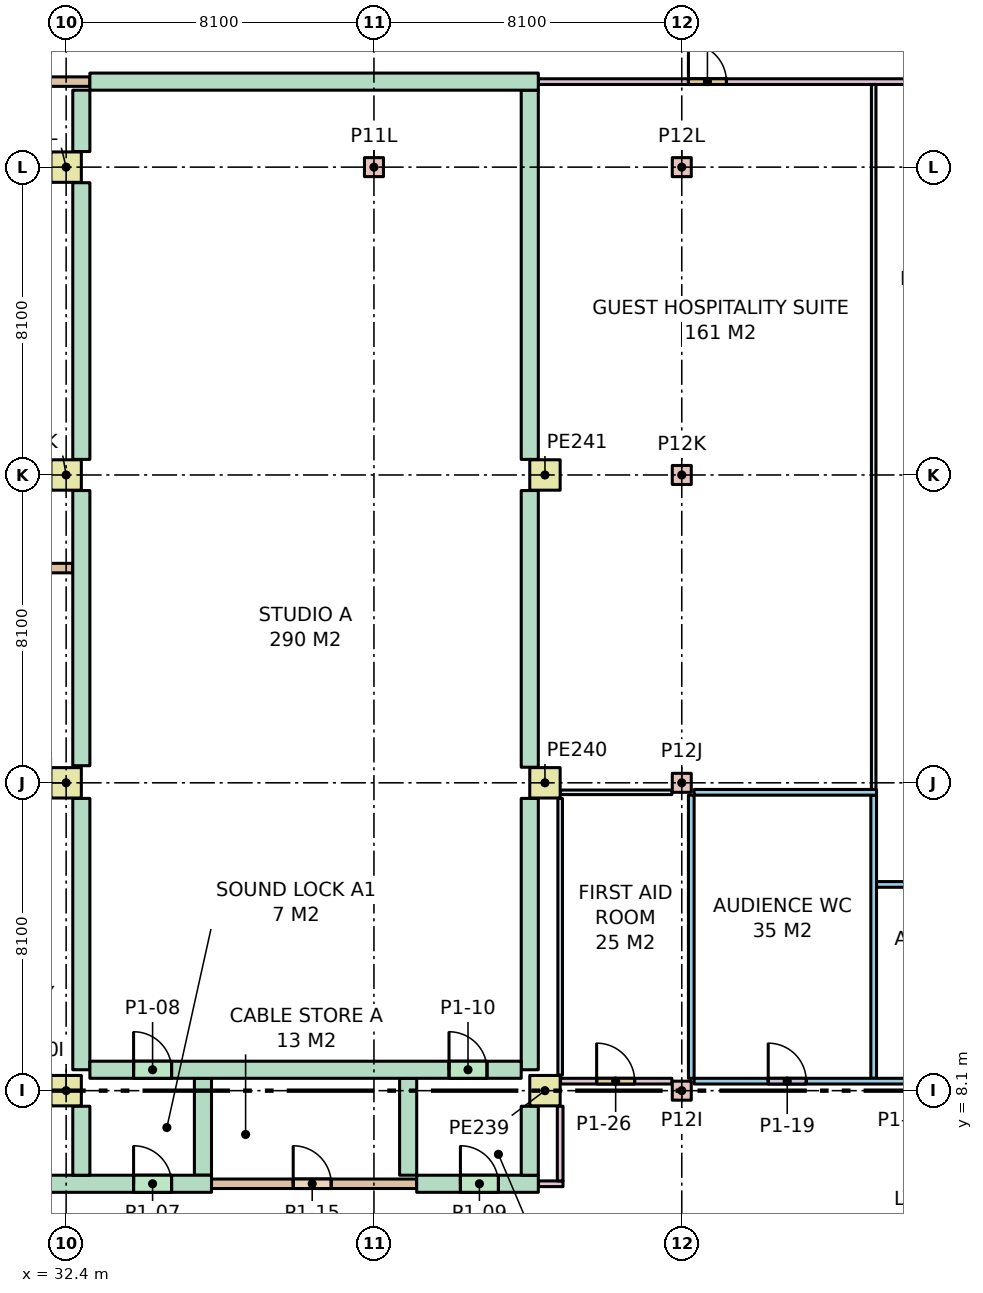
"""IFC4 building model, lengths in metres.
Left out: names, types, materials, properties, quantities, classifications, styles, units other than length and angle.
Written with IfcOpenShell. Run it as: python <this file> out.ifc"""

import sys

from ifc_helpers import new_model, si_unit, direction, frame, frame_2d, origin, origin_2d, place, context, subcontext, project, spatial, rectangle, extrude, element, fill, save


model = new_model("IFC4")
c1 = context("Model", 3, precision=1e-05, world=origin(), true_north=direction((0.0, 1.0)))
c2 = subcontext(c1, "Body", "Model", "MODEL_VIEW")
j1 = project(units=[si_unit("LENGTHUNIT", "METRE"), si_unit("PLANEANGLEUNIT", "RADIAN")], contexts=[c1])
p1 = place(None, origin())
s1 = spatial("IfcSite", under=j1, at=p1, CompositionType="ELEMENT")
p2 = place(p1, origin())
s2 = spatial("IfcBuilding", under=s1, at=p2, CompositionType="ELEMENT")
p3 = place(p2, frame((0.0, 0.0, 6.0)))
s3 = spatial("IfcBuildingStorey", under=s2, at=p3, CompositionType="ELEMENT", Elevation=6.0)
for number, where, z_axis, x_axis in (
    (1, (32.4, 8.1, 0.0), (0.0, 0.0, 1.0), (1.0, 0.0, 0.0)),
    (2, (32.4, 16.2, 0.0), (0.0, 0.0, 1.0), (1.0, 0.0, 0.0)),
    (3, (32.4, 24.3, 0.0), (0.0, 0.0, 1.0), (1.0, 0.0, 0.0)),
    (4, (32.4, 32.4, 0.0), (0.0, 0.0, 1.0), (1.0, 0.0, 0.0)),
):
    element("IfcColumn", number, at=place(p3, frame(where, z_axis=z_axis, x_axis=x_axis)), inside=s3, PredefinedType="COLUMN", context=c2, shape_type="SweptSolid", body=[
        extrude(rectangle(XDim=0.8, YDim=0.8, at=origin_2d()), origin(), (0.0, 0.0, 1.0), 7.0),
    ])
for number, where, z_axis, x_axis in (
    (5, (40.5, 32.4, 0.0), (0.0, 0.0, 1.0), (1.0, 0.0, 0.0)),
    (6, (48.6, 8.1, 0.0), (0.0, 0.0, 1.0), (1.0, 0.0, 0.0)),
    (7, (48.6, 16.2, 0.0), (0.0, 0.0, 1.0), (1.0, 0.0, 0.0)),
    (8, (48.6, 24.3, 0.0), (0.0, 0.0, 1.0), (1.0, 0.0, 0.0)),
    (9, (48.6, 32.4, 0.0), (0.0, 0.0, 1.0), (1.0, 0.0, 0.0)),
):
    element("IfcColumn", number, at=place(p3, frame(where, z_axis=z_axis, x_axis=x_axis)), inside=s3, PredefinedType="COLUMN", context=c2, shape_type="SweptSolid", body=[
        extrude(rectangle(XDim=0.5, YDim=0.5, at=origin_2d()), origin(), (0.0, 0.0, 1.0), 7.0),
    ])
for number, where, z_axis, x_axis in (
    (10, (45.0, 8.1, 0.0), (0.0, 0.0, 1.0), (1.0, 0.0, 0.0)),
    (11, (45.0, 16.2, 0.0), (0.0, 0.0, 1.0), (1.0, 0.0, 0.0)),
    (12, (45.0, 24.3, 0.0), (0.0, 0.0, 1.0), (1.0, 0.0, 0.0)),
):
    element("IfcColumn", number, at=place(p3, frame(where, z_axis=z_axis, x_axis=x_axis)), inside=s3, PredefinedType="COLUMN", context=c2, shape_type="SweptSolid", body=[
        extrude(rectangle(XDim=0.8, YDim=0.8, at=origin_2d()), origin(), (0.0, 0.0, 1.0), 7.0),
    ])
for number, where, z_axis, x_axis in (
    (13, (53.65, 8.425, 0.0), (0.0, 0.0, 1.0), (0.0, 1.0, 0.0)),
    (14, (48.85, 8.425, 0.0), (0.0, 0.0, 1.0), (0.0, 1.0, 0.0)),
):
    element("IfcWall", number, at=place(p3, frame(where, z_axis=z_axis, x_axis=x_axis)), inside=s3, PredefinedType="PARTITIONING", context=c2, shape_type="SweptSolid", body=[
        extrude(rectangle(XDim=7.45, YDim=0.15, at=frame_2d((3.725, 0.0))), origin(), (0.0, 0.0, 1.0), 6.68),
    ])
p4 = place(p3, frame((48.925, 15.95, 0.0), z_axis=(0.0, 0.0, 1.0), x_axis=(1.0, 0.0, 0.0)))
e15 = element("IfcWall", 15, at=p4, inside=s3, PredefinedType="PARTITIONING", context=c2, shape_type="SweptSolid", body=[
    extrude(rectangle(XDim=4.8, YDim=0.15, at=frame_2d((2.4, 0.0))), origin(), (0.0, 0.0, 1.0), 6.68),
])
p5 = place(p3, frame((48.925, 8.35, 0.0), z_axis=(0.0, 0.0, 1.0), x_axis=(1.0, 0.0, 0.0)))
e16 = element("IfcWall", 16, at=p5, inside=s3, PredefinedType="PARTITIONING", context=c2, shape_type="SweptSolid", body=[
    extrude(rectangle(XDim=7.515, YDim=0.15, at=frame_2d((3.757, 0.0))), origin(), (0.0, 0.0, 1.0), 6.68),
])
p6 = place(p5, frame((1.95, 0.0, 0.0)))
e17 = element("IfcOpeningElement", 17, at=p6, cuts=e16, PredefinedType="OPENING", context=c2, shape_type="SweptSolid", body=[
    extrude(rectangle(XDim=1.0, YDim=2.1, at=frame_2d((0.5, 1.05))), frame((0.0, 0.085, 0.0), z_axis=(0.0, -1.0, 0.0), x_axis=(1.0, 0.0, 0.0)), (0.0, 0.0, 1.0), 0.17),
])
p7 = place(p5, frame((5.65, 0.0, 0.0)))
e18 = element("IfcOpeningElement", 18, at=p7, cuts=e16, PredefinedType="OPENING", context=c2, shape_type="SweptSolid", body=[
    extrude(rectangle(XDim=1.0, YDim=2.1, at=frame_2d((0.5, 1.05))), frame((0.0, 0.085, 0.0), z_axis=(0.0, -1.0, 0.0), x_axis=(1.0, 0.0, 0.0)), (0.0, 0.0, 1.0), 0.17),
])
p8 = place(p3, frame((53.725, 13.527, 0.0), z_axis=(0.0, 0.0, 1.0), x_axis=(1.0, 0.0, 0.0)))
e19 = element("IfcWall", 19, at=p8, inside=s3, PredefinedType="PARTITIONING", context=c2, shape_type="SweptSolid", body=[
    extrude(rectangle(XDim=4.05, YDim=0.15, at=frame_2d((2.025, 0.0))), origin(), (0.0, 0.0, 1.0), 6.68),
])
p9 = place(p3, frame((53.65, 16.025, 0.0), z_axis=(0.0, 0.0, 1.0), x_axis=(0.0, 1.0, 0.0)))
e20 = element("IfcWall", 20, at=p9, inside=s3, PredefinedType="PARTITIONING", context=c2, shape_type="SweptSolid", body=[
    extrude(rectangle(XDim=18.55, YDim=0.12, at=frame_2d((9.275, 0.0))), origin(), (0.0, 0.0, 1.0), 6.68),
])
p10 = place(p3, frame((36.225, 5.65, 0.0), z_axis=(0.0, 0.0, 1.0), x_axis=(1.0, 0.0, 0.0)))
e21 = element("IfcWall", 21, at=p10, inside=s3, PredefinedType="PARTITIONING", context=c2, shape_type="SweptSolid", body=[
    extrude(rectangle(XDim=5.4, YDim=0.25, at=frame_2d((2.7, 0.0))), origin(), (0.0, 0.0, 1.0), 6.68),
])
p11 = place(p10, frame((2.15, 0.0, 0.0)))
e22 = element("IfcOpeningElement", 22, at=p11, cuts=e21, PredefinedType="OPENING", context=c2, shape_type="SweptSolid", body=[
    extrude(rectangle(XDim=1.0, YDim=2.1, at=frame_2d((0.5, 1.05))), frame((0.0, 0.135, 0.0), z_axis=(0.0, -1.0, 0.0), x_axis=(1.0, 0.0, 0.0)), (0.0, 0.0, 1.0), 0.27),
])
for number, where, z_axis, x_axis in (
    (23, (36.0, 5.875, 0.0), (0.0, 0.0, 1.0), (0.0, 1.0, 0.0)),
    (24, (41.4, 5.875, 0.0), (0.0, 0.0, 1.0), (0.0, 1.0, 0.0)),
):
    element("IfcWall", number, at=place(p3, frame(where, z_axis=z_axis, x_axis=x_axis)), inside=s3, PredefinedType="PARTITIONING", context=c2, shape_type="SweptSolid", body=[
        extrude(rectangle(XDim=2.55, YDim=0.45, at=frame_2d((1.275, 0.0))), origin(), (0.0, 0.0, 1.0), 6.68),
    ])
p12 = place(p3, frame((24.525, 5.65, 0.0), z_axis=(0.0, 0.0, 1.0), x_axis=(1.0, 0.0, 0.0)))
e25 = element("IfcWall", 25, at=p12, inside=s3, PredefinedType="PARTITIONING", context=c2, shape_type="SweptSolid", body=[
    extrude(rectangle(XDim=11.7, YDim=0.45, at=frame_2d((5.85, 0.0))), origin(), (0.0, 0.0, 1.0), 6.68),
])
p13 = place(p12, frame((9.65, 0.0, 0.0)))
e26 = element("IfcOpeningElement", 26, at=p13, cuts=e25, PredefinedType="OPENING", context=c2, shape_type="SweptSolid", body=[
    extrude(rectangle(XDim=1.0, YDim=2.1, at=frame_2d((0.5, 1.05))), frame((0.0, 0.235, 0.0), z_axis=(0.0, -1.0, 0.0), x_axis=(1.0, 0.0, 0.0)), (0.0, 0.0, 1.0), 0.47),
])
p14 = place(p12, frame((3.75, 0.0, 0.0)))
e27 = element("IfcOpeningElement", 27, at=p14, cuts=e25, PredefinedType="OPENING", context=c2, shape_type="SweptSolid", body=[
    extrude(rectangle(XDim=1.0, YDim=2.1, at=frame_2d((0.5, 1.05))), frame((0.0, 0.235, 0.0), z_axis=(0.0, -1.0, 0.0), x_axis=(1.0, 0.0, 0.0)), (0.0, 0.0, 1.0), 0.47),
])
p15 = place(p3, frame((32.8, 5.875, 0.0), z_axis=(0.0, 0.0, 1.0), x_axis=(0.0, 1.0, 0.0)))
e28 = element("IfcWall", 28, at=p15, inside=s3, PredefinedType="PARTITIONING", context=c2, shape_type="SweptSolid", body=[
    extrude(rectangle(XDim=1.815, YDim=0.45, at=frame_2d((0.907, 0.0))), origin(), (0.0, 0.0, 1.0), 6.68),
])
p16 = place(p3, frame((32.8, 8.65, 0.0), z_axis=(0.0, 0.0, 1.0), x_axis=(0.0, 1.0, 0.0)))
e29 = element("IfcWall", 29, at=p16, inside=s3, PredefinedType="PARTITIONING", context=c2, shape_type="SweptSolid", body=[
    extrude(rectangle(XDim=7.14, YDim=0.45, at=frame_2d((3.57, 0.0))), origin(), (0.0, 0.0, 1.0), 6.68),
])
p17 = place(p3, frame((44.825, 5.65, 0.0), z_axis=(0.0, 0.0, 1.0), x_axis=(1.0, 0.0, 0.0)))
e30 = element("IfcWall", 30, at=p17, inside=s3, PredefinedType="PARTITIONING", context=c2, shape_type="SweptSolid", body=[
    extrude(rectangle(XDim=0.65, YDim=0.15, at=frame_2d((0.325, 0.0))), origin(), (0.0, 0.0, 1.0), 6.68),
])
p18 = place(p3, frame((41.625, 5.65, 0.0), z_axis=(0.0, 0.0, 1.0), x_axis=(1.0, 0.0, 0.0)))
e31 = element("IfcWall", 31, at=p18, inside=s3, PredefinedType="PARTITIONING", context=c2, shape_type="SweptSolid", body=[
    extrude(rectangle(XDim=3.2, YDim=0.45, at=frame_2d((1.6, 0.0))), origin(), (0.0, 0.0, 1.0), 6.68),
])
p19 = place(p18, frame((1.15, 0.0, 0.0)))
e32 = element("IfcOpeningElement", 32, at=p19, cuts=e31, PredefinedType="OPENING", context=c2, shape_type="SweptSolid", body=[
    extrude(rectangle(XDim=1.0, YDim=2.1, at=frame_2d((0.5, 1.05))), frame((0.0, 0.235, 0.0), z_axis=(0.0, -1.0, 0.0), x_axis=(1.0, 0.0, 0.0)), (0.0, 0.0, 1.0), 0.47),
])
p20 = place(p3, frame((45.41, 15.95, 0.0), z_axis=(0.0, 0.0, 1.0), x_axis=(1.0, 0.0, 0.0)))
e33 = element("IfcWall", 33, at=p20, inside=s3, PredefinedType="PARTITIONING", context=c2, shape_type="SweptSolid", body=[
    extrude(rectangle(XDim=2.93, YDim=0.12, at=frame_2d((1.465, 0.0))), origin(), (0.0, 0.0, 1.0), 6.68),
])
p21 = place(p3, frame((45.4, 8.51, 0.0), z_axis=(0.0, 0.0, 1.0), x_axis=(0.0, 1.0, 0.0)))
e34 = element("IfcWall", 34, at=p21, inside=s3, PredefinedType="PARTITIONING", context=c2, shape_type="SweptSolid", body=[
    extrude(rectangle(XDim=7.28, YDim=0.12, at=frame_2d((3.64, 0.0))), origin(), (0.0, 0.0, 1.0), 6.68),
])
p22 = place(p3, frame((45.41, 8.35, 0.0), z_axis=(0.0, 0.0, 1.0), x_axis=(1.0, 0.0, 0.0)))
e35 = element("IfcWall", 35, at=p22, inside=s3, PredefinedType="PARTITIONING", context=c2, shape_type="SweptSolid", body=[
    extrude(rectangle(XDim=2.93, YDim=0.15, at=frame_2d((1.465, 0.0))), origin(), (0.0, 0.0, 1.0), 6.68),
])
p23 = place(p22, frame((0.95, 0.0, 0.0)))
e36 = element("IfcOpeningElement", 36, at=p23, cuts=e35, PredefinedType="OPENING", context=c2, shape_type="SweptSolid", body=[
    extrude(rectangle(XDim=1.0, YDim=2.1, at=frame_2d((0.5, 1.05))), frame((0.0, 0.085, 0.0), z_axis=(0.0, -1.0, 0.0), x_axis=(1.0, 0.0, 0.0)), (0.0, 0.0, 1.0), 0.17),
])
p24 = place(p3, frame((44.6, 5.875, 0.0), z_axis=(0.0, 0.0, 1.0), x_axis=(0.0, 1.0, 0.0)))
e37 = element("IfcWall", 37, at=p24, inside=s3, PredefinedType="PARTITIONING", context=c2, shape_type="SweptSolid", body=[
    extrude(rectangle(XDim=1.815, YDim=0.45, at=frame_2d((0.907, 0.0))), origin(), (0.0, 0.0, 1.0), 6.68),
])
p25 = place(p3, frame((45.4, 5.725, 0.0), z_axis=(0.0, 0.0, 1.0), x_axis=(0.0, 1.0, 0.0)))
e38 = element("IfcWall", 38, at=p25, inside=s3, PredefinedType="PARTITIONING", context=c2, shape_type="SweptSolid", body=[
    extrude(rectangle(XDim=1.965, YDim=0.15, at=frame_2d((0.982, 0.0))), origin(), (0.0, 0.0, 1.0), 6.68),
])
p26 = place(p3, frame((44.825, 34.65, 0.0), z_axis=(0.0, 0.0, 1.0), x_axis=(1.0, 0.0, 0.0)))
e39 = element("IfcWall", 39, at=p26, inside=s3, PredefinedType="PARTITIONING", context=c2, shape_type="SweptSolid", body=[
    extrude(rectangle(XDim=14.455, YDim=0.15, at=frame_2d((7.227, 0.0))), origin(), (0.0, 0.0, 1.0), 6.68),
])
p27 = place(p26, frame((3.95, 0.0, 0.0)))
e40 = element("IfcOpeningElement", 40, at=p27, cuts=e39, PredefinedType="OPENING", context=c2, shape_type="SweptSolid", body=[
    extrude(rectangle(XDim=1.0, YDim=2.1, at=frame_2d((0.5, 1.05))), frame((0.0, 0.085, 0.0), z_axis=(0.0, -1.0, 0.0), x_axis=(1.0, 0.0, 0.0)), (0.0, 0.0, 1.0), 0.17),
])
p28 = place(p26, frame((11.135, 0.0, 0.0)))
e41 = element("IfcOpeningElement", 41, at=p28, cuts=e39, PredefinedType="OPENING", context=c2, shape_type="SweptSolid", body=[
    extrude(rectangle(XDim=1.0, YDim=2.1, at=frame_2d((0.5, 1.05))), frame((0.0, 0.085, 0.0), z_axis=(0.0, -1.0, 0.0), x_axis=(1.0, 0.0, 0.0)), (0.0, 0.0, 1.0), 0.17),
])
p29 = place(p3, frame((44.6, 8.65, 0.0), z_axis=(0.0, 0.0, 1.0), x_axis=(0.0, 1.0, 0.0)))
e42 = element("IfcWall", 42, at=p29, inside=s3, PredefinedType="PARTITIONING", context=c2, shape_type="SweptSolid", body=[
    extrude(rectangle(XDim=7.14, YDim=0.45, at=frame_2d((3.57, 0.0))), origin(), (0.0, 0.0, 1.0), 6.68),
])
p30 = place(p3, frame((44.6, 16.61, 0.0), z_axis=(0.0, 0.0, 1.0), x_axis=(0.0, 1.0, 0.0)))
e43 = element("IfcWall", 43, at=p30, inside=s3, PredefinedType="PARTITIONING", context=c2, shape_type="SweptSolid", body=[
    extrude(rectangle(XDim=7.28, YDim=0.45, at=frame_2d((3.64, 0.0))), origin(), (0.0, 0.0, 1.0), 6.68),
])
p31 = place(p3, frame((44.6, 24.71, 0.0), z_axis=(0.0, 0.0, 1.0), x_axis=(0.0, 1.0, 0.0)))
e44 = element("IfcWall", 44, at=p31, inside=s3, PredefinedType="PARTITIONING", context=c2, shape_type="SweptSolid", body=[
    extrude(rectangle(XDim=9.715, YDim=0.45, at=frame_2d((4.857, 0.0))), origin(), (0.0, 0.0, 1.0), 6.68),
])
p32 = place(p3, frame((33.025, 8.65, 0.0), z_axis=(0.0, 0.0, 1.0), x_axis=(1.0, 0.0, 0.0)))
e45 = element("IfcWall", 45, at=p32, inside=s3, PredefinedType="PARTITIONING", context=c2, shape_type="SweptSolid", body=[
    extrude(rectangle(XDim=11.35, YDim=0.45, at=frame_2d((5.675, 0.0))), origin(), (0.0, 0.0, 1.0), 6.68),
])
p33 = place(p32, frame((1.15, 0.0, 0.0)))
e46 = element("IfcOpeningElement", 46, at=p33, cuts=e45, PredefinedType="OPENING", context=c2, shape_type="SweptSolid", body=[
    extrude(rectangle(XDim=1.0, YDim=2.1, at=frame_2d((0.5, 1.05))), frame((0.0, 0.235, 0.0), z_axis=(0.0, -1.0, 0.0), x_axis=(1.0, 0.0, 0.0)), (0.0, 0.0, 1.0), 0.47),
])
p34 = place(p32, frame((9.45, 0.0, 0.0)))
e47 = element("IfcOpeningElement", 47, at=p34, cuts=e45, PredefinedType="OPENING", context=c2, shape_type="SweptSolid", body=[
    extrude(rectangle(XDim=1.0, YDim=2.1, at=frame_2d((0.5, 1.05))), frame((0.0, 0.235, 0.0), z_axis=(0.0, -1.0, 0.0), x_axis=(1.0, 0.0, 0.0)), (0.0, 0.0, 1.0), 0.47),
])
p35 = place(p3, frame((25.168, 34.65, 0.0), z_axis=(0.0, 0.0, 1.0), x_axis=(1.0, 0.0, 0.0)))
e48 = element("IfcWall", 48, at=p35, inside=s3, PredefinedType="PARTITIONING", context=c2, shape_type="SweptSolid", body=[
    extrude(rectangle(XDim=7.857, YDim=0.25, at=frame_2d((3.928, 0.0))), origin(), (0.0, 0.0, 1.0), 6.68),
])
p36 = place(p35, frame((3.45, 0.0, 0.0)))
e49 = element("IfcOpeningElement", 49, at=p36, cuts=e48, PredefinedType="OPENING", context=c2, shape_type="SweptSolid", body=[
    extrude(rectangle(XDim=1.0, YDim=2.1, at=frame_2d((0.5, 1.05))), frame((0.0, 0.135, 0.0), z_axis=(0.0, -1.0, 0.0), x_axis=(1.0, 0.0, 0.0)), (0.0, 0.0, 1.0), 0.27),
])
p37 = place(p3, frame((33.025, 34.65, 0.0), z_axis=(0.0, 0.0, 1.0), x_axis=(1.0, 0.0, 0.0)))
e50 = element("IfcWall", 50, at=p37, inside=s3, PredefinedType="PARTITIONING", context=c2, shape_type="SweptSolid", body=[
    extrude(rectangle(XDim=11.8, YDim=0.45, at=frame_2d((5.9, 0.0))), origin(), (0.0, 0.0, 1.0), 6.68),
])
p38 = place(p3, frame((25.168, 21.85, 0.0), z_axis=(0.0, 0.0, 1.0), x_axis=(1.0, 0.0, 0.0)))
e51 = element("IfcWall", 51, at=p38, inside=s3, PredefinedType="PARTITIONING", context=c2, shape_type="SweptSolid", body=[
    extrude(rectangle(XDim=7.407, YDim=0.25, at=frame_2d((3.704, 0.0))), origin(), (0.0, 0.0, 1.0), 6.68),
])
p39 = place(p3, frame((32.8, 16.65, 0.0), z_axis=(0.0, 0.0, 1.0), x_axis=(0.0, 1.0, 0.0)))
e52 = element("IfcWall", 52, at=p39, inside=s3, PredefinedType="PARTITIONING", context=c2, shape_type="SweptSolid", body=[
    extrude(rectangle(XDim=7.24, YDim=0.45, at=frame_2d((3.62, 0.0))), origin(), (0.0, 0.0, 1.0), 6.68),
])
p40 = place(p3, frame((32.8, 24.71, 0.0), z_axis=(0.0, 0.0, 1.0), x_axis=(0.0, 1.0, 0.0)))
e53 = element("IfcWall", 53, at=p40, inside=s3, PredefinedType="PARTITIONING", context=c2, shape_type="SweptSolid", body=[
    extrude(rectangle(XDim=7.28, YDim=0.45, at=frame_2d((3.64, 0.0))), origin(), (0.0, 0.0, 1.0), 6.68),
])
p41 = place(p3, frame((32.8, 32.81, 0.0), z_axis=(0.0, 0.0, 1.0), x_axis=(0.0, 1.0, 0.0)))
e54 = element("IfcWall", 54, at=p41, inside=s3, PredefinedType="PARTITIONING", context=c2, shape_type="SweptSolid", body=[
    extrude(rectangle(XDim=1.615, YDim=0.45, at=frame_2d((0.808, 0.0))), origin(), (0.0, 0.0, 1.0), 6.68),
])
p42 = place(p13, origin())
e55 = element("IfcDoor", 55, at=p42, inside=s3, OperationType="SINGLE_SWING_LEFT", PredefinedType="DOOR", context=c2, shape_type="SweptSolid", body=[
    extrude(rectangle(XDim=1.0, YDim=2.1, at=frame_2d((0.5, 1.05))), frame((0.0, 0.025, 0.0), z_axis=(0.0, -1.0, 0.0), x_axis=(1.0, 0.0, 0.0)), (0.0, 0.0, 1.0), 0.05),
])
fill(e26, e55)
p43 = place(p33, origin())
e56 = element("IfcDoor", 56, at=p43, inside=s3, OperationType="SINGLE_SWING_LEFT", PredefinedType="DOOR", context=c2, shape_type="SweptSolid", body=[
    extrude(rectangle(XDim=1.0, YDim=2.1, at=frame_2d((0.5, 1.05))), frame((0.0, 0.025, 0.0), z_axis=(0.0, -1.0, 0.0), x_axis=(1.0, 0.0, 0.0)), (0.0, 0.0, 1.0), 0.05),
])
fill(e46, e56)
p44 = place(p19, origin())
e57 = element("IfcDoor", 57, at=p44, inside=s3, OperationType="SINGLE_SWING_LEFT", PredefinedType="DOOR", context=c2, shape_type="SweptSolid", body=[
    extrude(rectangle(XDim=1.0, YDim=2.1, at=frame_2d((0.5, 1.05))), frame((0.0, 0.025, 0.0), z_axis=(0.0, -1.0, 0.0), x_axis=(1.0, 0.0, 0.0)), (0.0, 0.0, 1.0), 0.05),
])
fill(e32, e57)
p45 = place(p34, origin())
e58 = element("IfcDoor", 58, at=p45, inside=s3, OperationType="SINGLE_SWING_LEFT", PredefinedType="DOOR", context=c2, shape_type="SweptSolid", body=[
    extrude(rectangle(XDim=1.0, YDim=2.1, at=frame_2d((0.5, 1.05))), frame((0.0, 0.025, 0.0), z_axis=(0.0, -1.0, 0.0), x_axis=(1.0, 0.0, 0.0)), (0.0, 0.0, 1.0), 0.05),
])
fill(e47, e58)
p46 = place(p11, origin())
e59 = element("IfcDoor", 59, at=p46, inside=s3, OperationType="SINGLE_SWING_LEFT", PredefinedType="DOOR", context=c2, shape_type="SweptSolid", body=[
    extrude(rectangle(XDim=1.0, YDim=2.1, at=frame_2d((0.5, 1.05))), frame((0.0, 0.025, 0.0), z_axis=(0.0, -1.0, 0.0), x_axis=(1.0, 0.0, 0.0)), (0.0, 0.0, 1.0), 0.05),
])
fill(e22, e59)
p47 = place(p6, origin())
e60 = element("IfcDoor", 60, at=p47, inside=s3, OperationType="SINGLE_SWING_LEFT", PredefinedType="DOOR", context=c2, shape_type="SweptSolid", body=[
    extrude(rectangle(XDim=1.0, YDim=2.1, at=frame_2d((0.5, 1.05))), frame((0.0, 0.025, 0.0), z_axis=(0.0, -1.0, 0.0), x_axis=(1.0, 0.0, 0.0)), (0.0, 0.0, 1.0), 0.05),
])
fill(e17, e60)
p48 = place(p27, origin())
e61 = element("IfcDoor", 61, at=p48, inside=s3, OperationType="SINGLE_SWING_LEFT", PredefinedType="DOOR", context=c2, shape_type="SweptSolid", body=[
    extrude(rectangle(XDim=1.0, YDim=2.1, at=frame_2d((0.5, 1.05))), frame((0.0, 0.025, 0.0), z_axis=(0.0, -1.0, 0.0), x_axis=(1.0, 0.0, 0.0)), (0.0, 0.0, 1.0), 0.05),
])
fill(e40, e61)
p49 = place(p23, origin())
e62 = element("IfcDoor", 62, at=p49, inside=s3, OperationType="SINGLE_SWING_LEFT", PredefinedType="DOOR", context=c2, shape_type="SweptSolid", body=[
    extrude(rectangle(XDim=1.0, YDim=2.1, at=frame_2d((0.5, 1.05))), frame((0.0, 0.025, 0.0), z_axis=(0.0, -1.0, 0.0), x_axis=(1.0, 0.0, 0.0)), (0.0, 0.0, 1.0), 0.05),
])
fill(e36, e62)
save(model, sys.argv[1])
